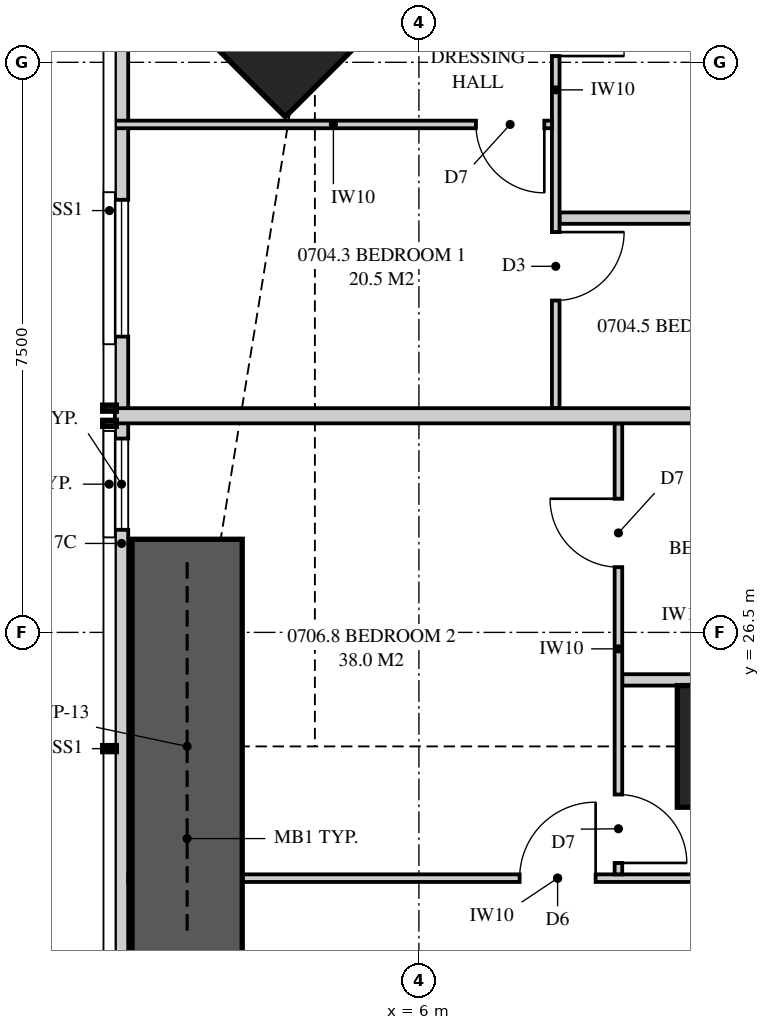
"""IFC4 building model, lengths in metres.
Left out: names, types, materials, properties, quantities, classifications, styles, units other than length and angle.
Written with IfcOpenShell. Run it as: python <this file> out.ifc"""

import sys

from ifc_helpers import new_model, si_unit, direction, frame, frame_2d, origin, origin_2d, place, context, subcontext, project, spatial, polyline, rectangle, outline, extrude, element, fill, save


model = new_model("IFC4")
c1 = context("Model", 3, precision=1e-05, world=origin(), true_north=direction((0.0, 1.0)))
c2 = subcontext(c1, "Body", "Model", "MODEL_VIEW")
j1 = project(units=[si_unit("LENGTHUNIT", "METRE"), si_unit("PLANEANGLEUNIT", "RADIAN")], contexts=[c1])
p1 = place(None, origin())
s1 = spatial("IfcSite", under=j1, at=p1, CompositionType="ELEMENT")
p2 = place(p1, origin())
s2 = spatial("IfcBuilding", under=s1, at=p2, CompositionType="ELEMENT")
p3 = place(p2, frame((0.0, 0.0, 31.05)))
s3 = spatial("IfcBuildingStorey", under=s2, at=p3, CompositionType="ELEMENT", Elevation=31.05)
p4 = place(p3, frame((4.631, 35.369, 0.0), z_axis=(0.0, 0.0, 1.0), x_axis=(0.707106781187, -0.707106781187, 0.0)))
e1 = element("IfcColumn", 1, at=p4, inside=s3, PredefinedType="COLUMN", context=c2, shape_type="SweptSolid", body=[
    extrude(rectangle(XDim=2.4, YDim=3.5, at=origin_2d()), origin(), (0.0, 0.0, 1.0), 3.35),
])
p5 = place(p3, frame((10.2, 25.0, 0.0), z_axis=(0.0, 0.0, 1.0), x_axis=(1.0, 0.0, 0.0)))
e2 = element("IfcColumn", 2, at=p5, inside=s3, PredefinedType="COLUMN", context=c2, shape_type="SweptSolid", body=[
    extrude(rectangle(XDim=1.6, YDim=1.6, at=origin_2d()), origin(), (0.0, 0.0, 1.0), 3.35),
])
p6 = place(p3, frame((2.087, 34.949, 0.0), z_axis=(0.0, 0.0, 1.0), x_axis=(0.0, -1.0, 0.0)))
e3 = element("IfcWall", 3, at=p6, inside=s3, PredefinedType="SOLIDWALL", context=c2, shape_type="SweptSolid", body=[
    extrude(outline(polyline([(0.0, 0.0), (14.557, 0.0), (14.557, 2.15), (9.949, 2.15), (9.949, 3.11), (9.823, 3.11), (9.823, 2.15), (9.73, 2.15), (9.73, 3.11), (0.0, 3.11), (0.0, 0.0)])), frame((0.0, 0.087, 0.0), z_axis=(0.0, -1.0, 0.0), x_axis=(1.0, 0.0, 0.0)), (0.0, 0.0, 1.0), 0.175),
])
p7 = place(p6, frame((2.757, 0.0, 0.4)))
e4 = element("IfcOpeningElement", 4, at=p7, cuts=e3, PredefinedType="OPENING", context=c2, shape_type="SweptSolid", body=[
    extrude(rectangle(XDim=1.8, YDim=1.7, at=frame_2d((0.9, 0.85))), frame((0.0, 0.097, 0.0), z_axis=(0.0, -1.0, 0.0), x_axis=(1.0, 0.0, 0.0)), (0.0, 0.0, 1.0), 0.195),
])
p8 = place(p6, frame((5.899, 0.0, 0.4)))
e5 = element("IfcOpeningElement", 5, at=p8, cuts=e3, PredefinedType="OPENING", context=c2, shape_type="SweptSolid", body=[
    extrude(rectangle(XDim=1.2, YDim=1.7, at=frame_2d((0.6, 0.85))), frame((0.0, 0.097, 0.0), z_axis=(0.0, -1.0, 0.0), x_axis=(1.0, 0.0, 0.0)), (0.0, 0.0, 1.0), 0.195),
])
p9 = place(p3, frame((7.8, 37.825, 0.0), z_axis=(0.0, 0.0, 1.0), x_axis=(0.0, -1.0, 0.0)))
e6 = element("IfcWall", 6, at=p9, inside=s3, PredefinedType="PARTITIONING", context=c2, shape_type="SweptSolid", body=[
    extrude(outline(polyline([(0.0, 0.0), (8.375, 0.0), (8.375, 3.11), (2.697, 3.11), (2.697, 2.15), (0.943, 2.15), (0.943, 3.11), (0.0, 3.11), (0.0, 0.0)])), frame((0.0, 0.05, 0.0), z_axis=(0.0, -1.0, 0.0), x_axis=(1.0, 0.0, 0.0)), (0.0, 0.0, 1.0), 0.1),
])
p10 = place(p9, frame((2.842, 0.0, 0.0)))
e7 = element("IfcOpeningElement", 7, at=p10, cuts=e6, PredefinedType="OPENING", context=c2, shape_type="SweptSolid", body=[
    extrude(rectangle(XDim=0.9, YDim=2.1, at=frame_2d((0.45, 1.05))), frame((0.0, 0.06, 0.0), z_axis=(0.0, -1.0, 0.0), x_axis=(1.0, 0.0, 0.0)), (0.0, 0.0, 1.0), 0.12),
])
p11 = place(p9, frame((6.059, 0.0, 0.0)))
e8 = element("IfcOpeningElement", 8, at=p11, cuts=e6, PredefinedType="OPENING", context=c2, shape_type="SweptSolid", body=[
    extrude(rectangle(XDim=0.9, YDim=2.1, at=frame_2d((0.45, 1.05))), frame((0.0, 0.06, 0.0), z_axis=(0.0, -1.0, 0.0), x_axis=(1.0, 0.0, 0.0)), (0.0, 0.0, 1.0), 0.12),
])
p12 = place(p3, frame((2.0, 33.183, 0.0), z_axis=(0.0, 0.0, 1.0), x_axis=(1.0, 0.0, 0.0)))
e9 = element("IfcWall", 9, at=p12, inside=s3, PredefinedType="PARTITIONING", context=c2, shape_type="SweptSolid", body=[
    extrude(outline(polyline([(0.0, 0.0), (5.75, 0.0), (5.75, 3.11), (3.148, 3.11), (3.148, 2.15), (1.406, 2.15), (1.406, 3.11), (0.0, 3.11), (0.0, 0.0)])), frame((0.0, 0.05, 0.0), z_axis=(0.0, -1.0, 0.0), x_axis=(1.0, 0.0, 0.0)), (0.0, 0.0, 1.0), 0.1),
])
p13 = place(p12, frame((4.75, 0.0, 0.0)))
e10 = element("IfcOpeningElement", 10, at=p13, cuts=e9, PredefinedType="OPENING", context=c2, shape_type="SweptSolid", body=[
    extrude(rectangle(XDim=0.9, YDim=2.1, at=frame_2d((0.45, 1.05))), frame((0.0, 0.06, 0.0), z_axis=(0.0, -1.0, 0.0), x_axis=(1.0, 0.0, 0.0)), (0.0, 0.0, 1.0), 0.12),
])
p14 = place(p3, frame((7.85, 31.95, 0.0), z_axis=(0.0, 0.0, 1.0), x_axis=(1.0, 0.0, 0.0)))
e11 = element("IfcWall", 11, at=p14, inside=s3, PredefinedType="PLUMBINGWALL", context=c2, shape_type="SweptSolid", body=[
    extrude(outline(polyline([(0.0, 0.0), (5.9, 0.0), (5.9, 3.11), (5.462, 3.11), (5.462, 2.541), (4.838, 2.541), (4.838, 3.11), (3.635, 3.11), (3.635, 2.51), (1.065, 2.51), (1.065, 3.11), (0.0, 3.11), (0.0, 0.0)])), frame((0.0, 0.075, 0.0), z_axis=(0.0, -1.0, 0.0), x_axis=(1.0, 0.0, 0.0)), (0.0, 0.0, 1.0), 0.15),
])
p15 = place(p14, frame((4.6, 0.0, 0.0)))
e12 = element("IfcOpeningElement", 12, at=p15, cuts=e11, PredefinedType="OPENING", context=c2, shape_type="SweptSolid", body=[
    extrude(rectangle(XDim=0.9, YDim=2.1, at=frame_2d((0.45, 1.05))), frame((0.0, 0.085, 0.0), z_axis=(0.0, -1.0, 0.0), x_axis=(1.0, 0.0, 0.0)), (0.0, 0.0, 1.0), 0.17),
])
p16 = place(p3, frame((2.0, 29.35, 0.0), z_axis=(0.0, 0.0, 1.0), x_axis=(1.0, 0.0, 0.0)))
e13 = element("IfcWall", 13, at=p16, inside=s3, PredefinedType="PARTITIONING", context=c2, shape_type="SweptSolid", body=[
    extrude(outline(polyline([(0.0, 0.0), (15.525, 0.0), (15.525, 3.11), (11.337, 3.11), (11.337, 2.541), (10.663, 2.541), (10.663, 3.11), (9.51, 3.11), (9.51, 2.51), (6.89, 2.51), (6.89, 3.11), (2.969, 3.11), (2.969, 2.541), (2.577, 2.541), (2.577, 2.15), (0.733, 2.15), (0.733, 3.11), (0.0, 3.11), (0.0, 0.0)])), frame((0.0, 0.1, 0.0), z_axis=(0.0, -1.0, 0.0), x_axis=(1.0, 0.0, 0.0)), (0.0, 0.0, 1.0), 0.2),
])
p17 = place(p3, frame((2.175, 23.267, 0.0), z_axis=(0.0, 0.0, 1.0), x_axis=(1.0, 0.0, 0.0)))
e14 = element("IfcWall", 14, at=p17, inside=s3, PredefinedType="PARTITIONING", context=c2, shape_type="SweptSolid", body=[
    extrude(outline(polyline([(0.529, 2.15), (0.0, 2.15), (0.0, 0.0), (0.529, 0.0), (0.529, 0.274), (1.021, 0.274), (1.021, 0.0), (11.3, 0.0), (11.3, 3.11), (9.285, 3.11), (9.285, 2.51), (6.765, 2.51), (6.765, 3.11), (1.635, 3.11), (1.635, 2.15), (1.021, 2.15), (1.021, 1.876), (0.529, 1.876), (0.529, 2.15)])), frame((0.0, 0.05, 0.0), z_axis=(0.0, -1.0, 0.0), x_axis=(1.0, 0.0, 0.0)), (0.0, 0.0, 1.0), 0.1),
])
p18 = place(p17, frame((5.15, 0.0, 0.0)))
e15 = element("IfcOpeningElement", 15, at=p18, cuts=e14, PredefinedType="OPENING", context=c2, shape_type="SweptSolid", body=[
    extrude(rectangle(XDim=1.0, YDim=2.1, at=frame_2d((0.5, 1.05))), frame((0.0, 0.06, 0.0), z_axis=(0.0, -1.0, 0.0), x_axis=(1.0, 0.0, 0.0)), (0.0, 0.0, 1.0), 0.12),
])
p19 = place(p3, frame((8.625, 23.317, 0.0), z_axis=(0.0, 0.0, 1.0), x_axis=(0.0, 1.0, 0.0)))
e16 = element("IfcWall", 16, at=p19, inside=s3, PredefinedType="PARTITIONING", context=c2, shape_type="SweptSolid", body=[
    extrude(outline(polyline([(0.0, 0.0), (5.933, 0.0), (5.933, 3.11), (1.971, 3.11), (1.971, 2.541), (1.396, 2.541), (1.396, 3.11), (0.0, 3.11), (0.0, 0.0)])), frame((0.0, 0.05, 0.0), z_axis=(0.0, -1.0, 0.0), x_axis=(1.0, 0.0, 0.0)), (0.0, 0.0, 1.0), 0.1),
])
p20 = place(p19, frame((0.15, 0.0, 0.0)))
e17 = element("IfcOpeningElement", 17, at=p20, cuts=e16, PredefinedType="OPENING", context=c2, shape_type="SweptSolid", body=[
    extrude(rectangle(XDim=0.9, YDim=2.1, at=frame_2d((0.45, 1.05))), frame((0.0, 0.06, 0.0), z_axis=(0.0, -1.0, 0.0), x_axis=(1.0, 0.0, 0.0)), (0.0, 0.0, 1.0), 0.12),
])
p21 = place(p19, frame((4.042, 0.0, 0.0)))
e18 = element("IfcOpeningElement", 18, at=p21, cuts=e16, PredefinedType="OPENING", context=c2, shape_type="SweptSolid", body=[
    extrude(rectangle(XDim=0.9, YDim=2.1, at=frame_2d((0.45, 1.05))), frame((0.0, 0.06, 0.0), z_axis=(0.0, -1.0, 0.0), x_axis=(1.0, 0.0, 0.0)), (0.0, 0.0, 1.0), 0.12),
])
p22 = place(p3, frame((8.675, 25.875, 0.0), z_axis=(0.0, 0.0, 1.0), x_axis=(1.0, 0.0, 0.0)))
e19 = element("IfcWall", 19, at=p22, inside=s3, PredefinedType="PLUMBINGWALL", context=c2, shape_type="SweptSolid", body=[
    extrude(outline(polyline([(0.0, 0.0), (4.8, 0.0), (4.8, 3.11), (4.637, 3.11), (4.637, 2.541), (4.013, 2.541), (4.013, 3.11), (2.81, 3.11), (2.81, 2.51), (0.24, 2.51), (0.24, 3.11), (0.0, 3.11), (0.0, 0.0)])), frame((0.0, 0.075, 0.0), z_axis=(0.0, -1.0, 0.0), x_axis=(1.0, 0.0, 0.0)), (0.0, 0.0, 1.0), 0.15),
])
p23 = place(p3, frame((2.95, 22.275, 0.0), z_axis=(0.0, 0.0, 1.0), x_axis=(0.0, 1.0, 0.0)))
e20 = element("IfcWall", 20, at=p23, inside=s3, PredefinedType="SHEAR", context=c2, shape_type="SweptSolid", body=[
    extrude(rectangle(XDim=5.45, YDim=1.45, at=frame_2d((2.725, 0.0))), origin(), (0.0, 0.0, 1.0), 3.35),
])
p24 = place(p7, origin())
e21 = element("IfcWindow", 21, at=p24, inside=s3, PartitioningType="SINGLE_PANEL", PredefinedType="WINDOW", context=c2, shape_type="SweptSolid", body=[
    extrude(rectangle(XDim=1.8, YDim=1.7, at=frame_2d((0.9, 0.85))), frame((0.0, 0.03, 0.0), z_axis=(0.0, -1.0, 0.0), x_axis=(1.0, 0.0, 0.0)), (0.0, 0.0, 1.0), 0.06),
])
fill(e4, e21)
p25 = place(p8, origin())
e22 = element("IfcWindow", 22, at=p25, inside=s3, PartitioningType="SINGLE_PANEL", PredefinedType="WINDOW", context=c2, shape_type="SweptSolid", body=[
    extrude(rectangle(XDim=1.2, YDim=1.7, at=frame_2d((0.6, 0.85))), frame((0.0, 0.03, 0.0), z_axis=(0.0, -1.0, 0.0), x_axis=(1.0, 0.0, 0.0)), (0.0, 0.0, 1.0), 0.06),
])
fill(e5, e22)
p26 = place(p13, frame((0.9, 0.0, 0.0), z_axis=(0.0, 0.0, 1.0), x_axis=(-1.0, 0.0, 0.0)))
e23 = element("IfcDoor", 23, at=p26, inside=s3, OperationType="SINGLE_SWING_LEFT", PredefinedType="DOOR", context=c2, shape_type="SweptSolid", body=[
    extrude(rectangle(XDim=0.9, YDim=2.1, at=frame_2d((0.45, 1.05))), frame((0.0, 0.025, 0.0), z_axis=(0.0, -1.0, 0.0), x_axis=(1.0, 0.0, 0.0)), (0.0, 0.0, 1.0), 0.05),
])
fill(e10, e23)
p27 = place(p10, origin())
e24 = element("IfcDoor", 24, at=p27, inside=s3, OperationType="SINGLE_SWING_RIGHT", PredefinedType="DOOR", context=c2, shape_type="SweptSolid", body=[
    extrude(rectangle(XDim=0.9, YDim=2.1, at=frame_2d((0.45, 1.05))), frame((0.0, 0.025, 0.0), z_axis=(0.0, -1.0, 0.0), x_axis=(1.0, 0.0, 0.0)), (0.0, 0.0, 1.0), 0.05),
])
fill(e7, e24)
p28 = place(p11, origin())
e25 = element("IfcDoor", 25, at=p28, inside=s3, OperationType="SINGLE_SWING_LEFT", PredefinedType="DOOR", context=c2, shape_type="SweptSolid", body=[
    extrude(rectangle(XDim=0.9, YDim=2.1, at=frame_2d((0.45, 1.05))), frame((0.0, 0.025, 0.0), z_axis=(0.0, -1.0, 0.0), x_axis=(1.0, 0.0, 0.0)), (0.0, 0.0, 1.0), 0.05),
])
fill(e8, e25)
p29 = place(p18, origin())
e26 = element("IfcDoor", 26, at=p29, inside=s3, OperationType="SINGLE_SWING_RIGHT", PredefinedType="DOOR", context=c2, shape_type="SweptSolid", body=[
    extrude(rectangle(XDim=1.0, YDim=2.1, at=frame_2d((0.5, 1.05))), frame((0.0, 0.025, 0.0), z_axis=(0.0, -1.0, 0.0), x_axis=(1.0, 0.0, 0.0)), (0.0, 0.0, 1.0), 0.05),
])
fill(e15, e26)
p30 = place(p20, frame((0.9, 0.0, 0.0), z_axis=(0.0, 0.0, 1.0), x_axis=(-1.0, 0.0, 0.0)))
e27 = element("IfcDoor", 27, at=p30, inside=s3, OperationType="SINGLE_SWING_RIGHT", PredefinedType="DOOR", context=c2, shape_type="SweptSolid", body=[
    extrude(rectangle(XDim=0.9, YDim=2.1, at=frame_2d((0.45, 1.05))), frame((0.0, 0.025, 0.0), z_axis=(0.0, -1.0, 0.0), x_axis=(1.0, 0.0, 0.0)), (0.0, 0.0, 1.0), 0.05),
])
fill(e17, e27)
p31 = place(p21, origin())
e28 = element("IfcDoor", 28, at=p31, inside=s3, OperationType="SINGLE_SWING_RIGHT", PredefinedType="DOOR", context=c2, shape_type="SweptSolid", body=[
    extrude(rectangle(XDim=0.9, YDim=2.1, at=frame_2d((0.45, 1.05))), frame((0.0, 0.025, 0.0), z_axis=(0.0, -1.0, 0.0), x_axis=(1.0, 0.0, 0.0)), (0.0, 0.0, 1.0), 0.05),
])
fill(e18, e28)
save(model, sys.argv[1])
